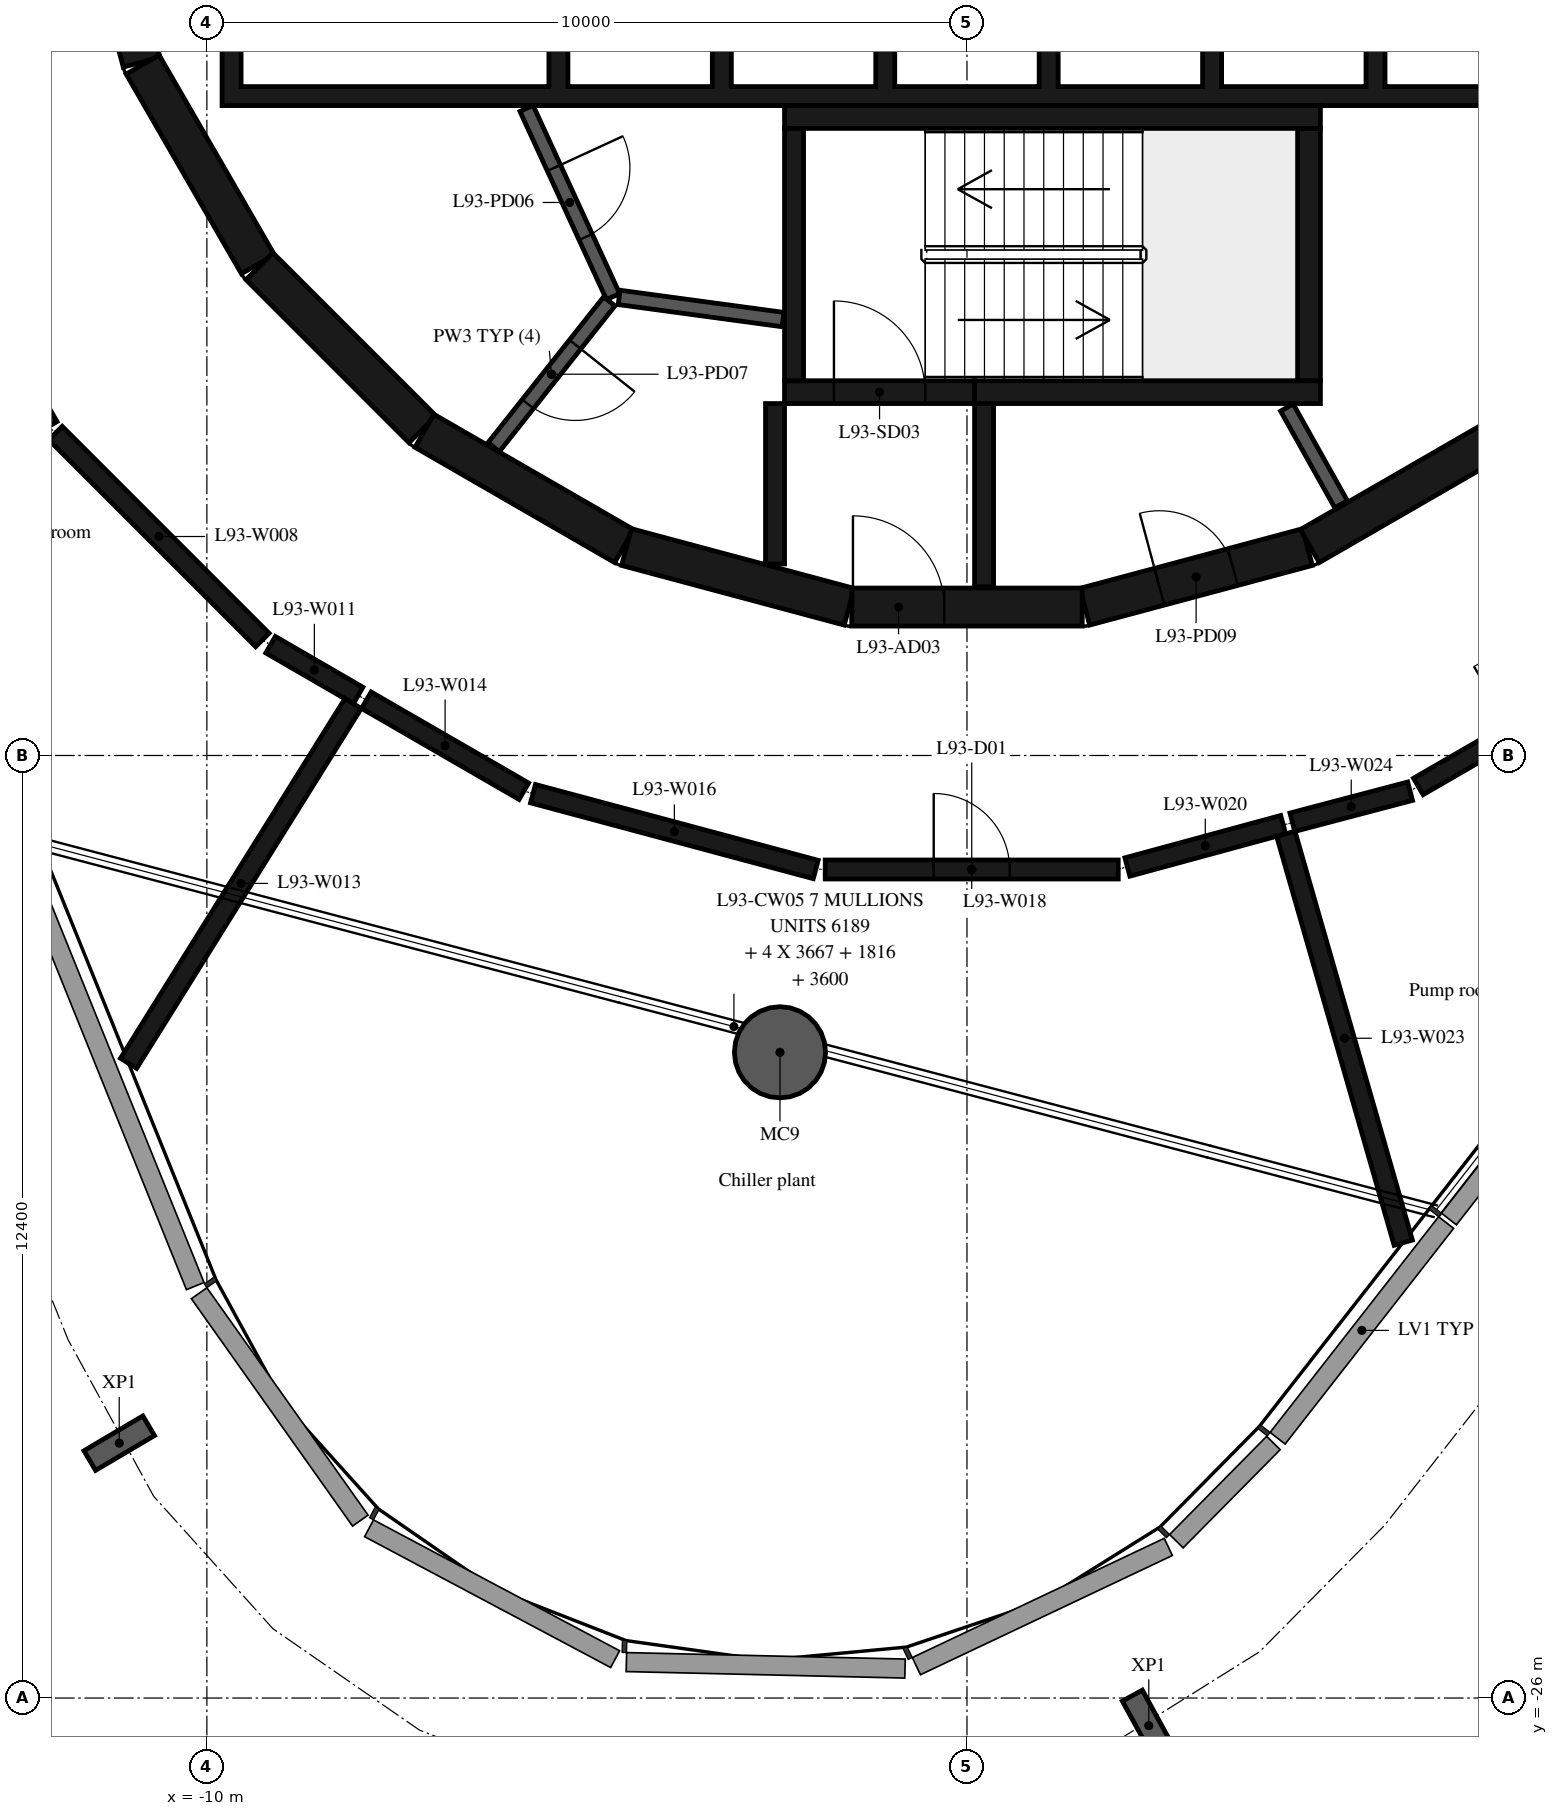
"""IFC4 building model, lengths in metres.
Left out: names, types, materials, properties, quantities, classifications, styles, units other than length and angle.
Written with IfcOpenShell. Run it as: python <this file> out.ifc"""

import sys

from ifc_helpers import new_model, si_unit, direction, frame, frame_2d, origin, origin_2d, place, context, subcontext, project, spatial, polyline, rectangle, hollow_circle, i_section, outline, extrude, element, fill, save


model = new_model("IFC4")
c1 = context("Model", 3, precision=1e-05, world=origin(), true_north=direction((0.0, 1.0)))
c2 = subcontext(c1, "Body", "Model", "MODEL_VIEW")
j1 = project(units=[si_unit("LENGTHUNIT", "METRE"), si_unit("PLANEANGLEUNIT", "RADIAN")], contexts=[c1])
p1 = place(None, origin())
s1 = spatial("IfcSite", under=j1, at=p1, CompositionType="ELEMENT")
p2 = place(p1, origin())
s2 = spatial("IfcBuilding", under=s1, at=p2, CompositionType="ELEMENT")
p3 = place(p2, frame((0.0, 0.0, 361.0)))
s3 = spatial("IfcBuildingStorey", under=s2, at=p3, CompositionType="ELEMENT", Elevation=361.0)
p4 = place(p3, frame((-2.46, -17.505, -0.38), z_axis=(0.0, 0.0, 1.0), x_axis=(1.0, 0.0, 0.0)))
e1 = element("IfcColumn", 1, at=p4, inside=s3, PredefinedType="COLUMN", context=c2, shape_type="SweptSolid", body=[
    extrude(hollow_circle(Radius=0.6, WallThickness=0.03, at=origin_2d()), origin(), (0.0, 0.0, 1.0), 5.2),
])
for number, where, z_axis, x_axis in (
    (2, (-11.153, -22.647, -0.38), (0.0, 0.0, 1.0), (-0.509, 0.861, 0.0)),
    (3, (2.392, -26.363, -0.38), (0.0, 0.0, 1.0), (-0.877, -0.48, 0.0)),
):
    element("IfcColumn", number, at=place(p3, frame(where, z_axis=z_axis, x_axis=x_axis)), inside=s3, PredefinedType="COLUMN", context=c2, shape_type="SweptSolid", body=[
        extrude(i_section(OverallWidth=0.3, OverallDepth=0.9, WebThickness=0.019, FlangeThickness=0.035, FilletRadius=0.03, at=origin_2d()), origin(), (0.0, 0.0, 1.0), 5.2),
    ])
p5 = place(p3, frame((1.55, -11.643, 0.0), z_axis=(0.0, 0.0, 1.0), x_axis=(0.965948410781, 0.258734743916, 0.0)))
e4 = element("IfcWall", 4, at=p5, inside=s3, PredefinedType="SHEAR", context=c2, shape_type="SweptSolid", body=[
    extrude(rectangle(XDim=3.033, YDim=0.5, at=frame_2d((1.516, 0.0))), origin(), (0.0, 0.0, 1.0), 4.82),
])
p6 = place(p5, frame((1.016, 0.0, 0.0)))
e5 = element("IfcOpeningElement", 5, at=p6, cuts=e4, PredefinedType="OPENING", context=c2, shape_type="SweptSolid", body=[
    extrude(rectangle(XDim=1.0, YDim=2.4, at=frame_2d((0.5, 1.2))), frame((0.0, 0.26, 0.0), z_axis=(0.0, -1.0, 0.0), x_axis=(1.0, 0.0, 0.0)), (0.0, 0.0, 1.0), 0.52),
])
p7 = place(p3, frame((4.51, -10.845, 0.0), z_axis=(0.0, 0.0, 1.0), x_axis=(0.865975092491, 0.500087131594, 0.0)))
e6 = element("IfcWall", 6, at=p7, inside=s3, PredefinedType="SHEAR", context=c2, shape_type="SweptSolid", body=[
    extrude(rectangle(XDim=3.033, YDim=0.5, at=frame_2d((1.516, 0.0))), origin(), (0.0, 0.0, 1.0), 4.82),
])
p8 = place(p3, frame((-11.643, -1.55, 0.0), z_axis=(0.0, 0.0, 1.0), x_axis=(0.258734743916, -0.965948410781, 0.0)))
e7 = element("IfcWall", 7, at=p8, inside=s3, PredefinedType="SHEAR", context=c2, shape_type="SweptSolid", body=[
    extrude(rectangle(XDim=3.033, YDim=0.5, at=frame_2d((1.516, 0.0))), origin(), (0.0, 0.0, 1.0), 4.82),
])
p9 = place(p8, frame((1.016, 0.0, 0.0)))
e8 = element("IfcOpeningElement", 8, at=p9, cuts=e7, PredefinedType="OPENING", context=c2, shape_type="SweptSolid", body=[
    extrude(rectangle(XDim=1.0, YDim=2.4, at=frame_2d((0.5, 1.2))), frame((0.0, 0.26, 0.0), z_axis=(0.0, -1.0, 0.0), x_axis=(1.0, 0.0, 0.0)), (0.0, 0.0, 1.0), 0.52),
])
p10 = place(p3, frame((-10.845, -4.51, 0.0), z_axis=(0.0, 0.0, 1.0), x_axis=(0.500087131594, -0.865975092491, 0.0)))
e9 = element("IfcWall", 9, at=p10, inside=s3, PredefinedType="SHEAR", context=c2, shape_type="SweptSolid", body=[
    extrude(rectangle(XDim=3.033, YDim=0.5, at=frame_2d((1.516, 0.0))), origin(), (0.0, 0.0, 1.0), 4.82),
])
p11 = place(p3, frame((-9.308, -7.164, 0.0), z_axis=(0.0, 0.0, 1.0), x_axis=(0.707106781187, -0.707106781187, 0.0)))
e10 = element("IfcWall", 10, at=p11, inside=s3, PredefinedType="SHEAR", context=c2, shape_type="SweptSolid", body=[
    extrude(rectangle(XDim=3.032, YDim=0.5, at=frame_2d((1.516, 0.0))), origin(), (0.0, 0.0, 1.0), 4.82),
])
for number, where, z_axis, x_axis in (
    (11, (-7.137, -9.329, 0.0), (0.0, 0.0, 1.0), (0.866, -0.5, 0.0)),
    (12, (-4.479, -10.858, 0.0), (0.0, 0.0, 1.0), (0.966, -0.259, 0.0)),
):
    element("IfcWall", number, at=place(p3, frame(where, z_axis=z_axis, x_axis=x_axis)), inside=s3, PredefinedType="SHEAR", context=c2, shape_type="SweptSolid", body=[
        extrude(rectangle(XDim=3.033, YDim=0.5, at=frame_2d((1.516, 0.0))), origin(), (0.0, 0.0, 1.0), 4.82),
    ])
p12 = place(p3, frame((-1.516, -11.647, 0.0), z_axis=(0.0, 0.0, 1.0), x_axis=(1.0, 0.0, 0.0)))
e13 = element("IfcWall", 13, at=p12, inside=s3, PredefinedType="SHEAR", context=c2, shape_type="SweptSolid", body=[
    extrude(rectangle(XDim=3.033, YDim=0.5, at=frame_2d((1.516, 0.0))), origin(), (0.0, 0.0, 1.0), 4.82),
])
p13 = place(p12, frame((0.016, 0.0, 0.0)))
e14 = element("IfcOpeningElement", 14, at=p13, cuts=e13, PredefinedType="OPENING", context=c2, shape_type="SweptSolid", body=[
    extrude(rectangle(XDim=1.2, YDim=2.1, at=frame_2d((0.6, 1.05))), frame((0.0, 0.26, 0.0), z_axis=(0.0, -1.0, 0.0), x_axis=(1.0, 0.0, 0.0)), (0.0, 0.0, 1.0), 0.52),
])
p14 = place(p3, frame((-2.275, -8.67, 0.0), z_axis=(0.0, 0.0, 1.0), x_axis=(0.0, 1.0, 0.0)))
e15 = element("IfcWall", 15, at=p14, inside=s3, PredefinedType="SHEAR", context=c2, shape_type="SweptSolid", body=[
    extrude(rectangle(XDim=3.32, YDim=0.25, at=frame_2d((1.66, 0.0))), origin(), (0.0, 0.0, 1.0), 4.82),
])
p15 = place(p3, frame((-2.4, -5.2, 0.0), z_axis=(0.0, 0.0, 1.0), x_axis=(1.0, 0.0, 0.0)))
e16 = element("IfcWall", 16, at=p15, inside=s3, PredefinedType="SHEAR", context=c2, shape_type="SweptSolid", body=[
    extrude(rectangle(XDim=7.05, YDim=0.3, at=frame_2d((3.525, 0.0))), origin(), (0.0, 0.0, 1.0), 4.82),
])
p16 = place(p3, frame((4.5, -8.67, 0.0), z_axis=(0.0, 0.0, 1.0), x_axis=(0.0, 1.0, 0.0)))
e17 = element("IfcWall", 17, at=p16, inside=s3, PredefinedType="SHEAR", context=c2, shape_type="SweptSolid", body=[
    extrude(rectangle(XDim=3.32, YDim=0.3, at=frame_2d((1.66, 0.0))), origin(), (0.0, 0.0, 1.0), 4.82),
])
p17 = place(p3, frame((0.1, -8.82, 0.0), z_axis=(0.0, 0.0, 1.0), x_axis=(1.0, 0.0, 0.0)))
e18 = element("IfcWall", 18, at=p17, inside=s3, PredefinedType="SHEAR", context=c2, shape_type="SweptSolid", body=[
    extrude(rectangle(XDim=4.55, YDim=0.3, at=frame_2d((2.275, 0.0))), origin(), (0.0, 0.0, 1.0), 4.82),
])
p18 = place(p3, frame((-2.4, -8.82, 0.0), z_axis=(0.0, 0.0, 1.0), x_axis=(1.0, 0.0, 0.0)))
e19 = element("IfcWall", 19, at=p18, inside=s3, PredefinedType="SHEAR", context=c2, shape_type="SweptSolid", body=[
    extrude(rectangle(XDim=2.5, YDim=0.3, at=frame_2d((1.25, 0.0))), origin(), (0.0, 0.0, 1.0), 4.82),
])
p19 = place(p18, frame((0.65, 0.0, 0.0)))
e20 = element("IfcOpeningElement", 20, at=p19, cuts=e19, PredefinedType="OPENING", context=c2, shape_type="SweptSolid", body=[
    extrude(rectangle(XDim=1.2, YDim=2.1, at=frame_2d((0.6, 1.05))), frame((0.0, 0.16, 0.0), z_axis=(0.0, -1.0, 0.0), x_axis=(1.0, 0.0, 0.0)), (0.0, 0.0, 1.0), 0.32),
])
p20 = place(p3, frame((-2.525, -8.97, 0.0), z_axis=(0.0, 0.0, 1.0), x_axis=(0.0, -1.0, 0.0)))
e21 = element("IfcWall", 21, at=p20, inside=s3, PredefinedType="SHEAR", context=c2, shape_type="SweptSolid", body=[
    extrude(rectangle(XDim=2.11, YDim=0.25, at=frame_2d((1.055, 0.0))), origin(), (0.0, 0.0, 1.0), 4.82),
])
p21 = place(p3, frame((0.225, -8.97, 0.0), z_axis=(0.0, 0.0, 1.0), x_axis=(0.0, -1.0, 0.0)))
e22 = element("IfcWall", 22, at=p21, inside=s3, PredefinedType="SHEAR", context=c2, shape_type="SweptSolid", body=[
    extrude(rectangle(XDim=2.41, YDim=0.25, at=frame_2d((1.205, 0.0))), origin(), (0.0, 0.0, 1.0), 4.82),
])
p22 = place(p3, origin())
e23 = element("IfcWall", 23, at=p22, inside=s3, PredefinedType="SHEAR", context=c2, shape_type="SweptSolid", body=[
    extrude(outline(polyline([(9.8, -5.05), (9.8, -4.8), (9.8, -1.9), (9.55, -1.9), (9.55, -4.8), (7.65, -4.8), (7.65, -1.9), (7.4, -1.9), (7.4, -4.8), (5.5, -4.8), (5.5, -1.9), (5.25, -1.9), (5.25, -4.8), (3.35, -4.8), (3.35, -1.9), (3.1, -1.9), (3.1, -4.8), (1.2, -4.8), (1.2, -1.9), (0.95, -1.9), (0.95, -4.8), (-0.95, -4.8), (-0.95, -1.9), (-1.2, -1.9), (-1.2, -4.8), (-3.1, -4.8), (-3.1, -1.9), (-3.35, -1.9), (-3.35, -4.8), (-5.25, -4.8), (-5.25, -1.9), (-5.5, -1.9), (-5.5, -4.8), (-9.55, -4.8), (-9.55, -1.9), (-9.8, -1.9), (-9.8, -4.8), (-9.8, -5.05), (9.8, -5.05)])), origin(), (0.0, 0.0, 1.0), 4.82),
])
p23 = place(p3, frame((4.922, -10.296, 0.0), z_axis=(0.0, 0.0, 1.0), x_axis=(-0.48860846254, 0.872503163509, 0.0)))
e24 = element("IfcWall", 24, at=p23, inside=s3, PredefinedType="PARTITIONING", context=c2, shape_type="SweptSolid", body=[
    extrude(rectangle(XDim=1.459, YDim=0.19, at=frame_2d((0.73, 0.0))), origin(), (0.0, 0.0, 1.0), 4.82),
])
p24 = place(p3, frame((-5.795, -5.086, 0.0), z_axis=(0.0, 0.0, 1.0), x_axis=(0.417887867606, -0.908498613157, 0.0)))
e25 = element("IfcWall", 25, at=p24, inside=s3, PredefinedType="PARTITIONING", context=c2, shape_type="SweptSolid", body=[
    extrude(rectangle(XDim=2.726, YDim=0.19, at=frame_2d((1.363, 0.0))), origin(), (0.0, 0.0, 1.0), 4.82),
])
p25 = place(p24, frame((0.863, 0.0, 0.0)))
e26 = element("IfcOpeningElement", 26, at=p25, cuts=e25, PredefinedType="OPENING", context=c2, shape_type="SweptSolid", body=[
    extrude(rectangle(XDim=1.0, YDim=2.4, at=frame_2d((0.5, 1.2))), frame((0.0, 0.105, 0.0), z_axis=(0.0, -1.0, 0.0), x_axis=(1.0, 0.0, 0.0)), (0.0, 0.0, 1.0), 0.21),
])
p26 = place(p3, frame((-4.706, -7.625, 0.0), z_axis=(0.0, 0.0, 1.0), x_axis=(-0.621392599334, -0.783499353856, 0.0)))
e27 = element("IfcWall", 27, at=p26, inside=s3, PredefinedType="PARTITIONING", context=c2, shape_type="SweptSolid", body=[
    extrude(rectangle(XDim=2.447, YDim=0.19, at=frame_2d((1.224, 0.0))), origin(), (0.0, 0.0, 1.0), 4.82),
])
p27 = place(p26, frame((0.724, 0.0, 0.0)))
e28 = element("IfcOpeningElement", 28, at=p27, cuts=e27, PredefinedType="OPENING", context=c2, shape_type="SweptSolid", body=[
    extrude(rectangle(XDim=1.0, YDim=2.4, at=frame_2d((0.5, 1.2))), frame((0.0, 0.105, 0.0), z_axis=(0.0, -1.0, 0.0), x_axis=(1.0, 0.0, 0.0)), (0.0, 0.0, 1.0), 0.21),
])
p28 = place(p3, frame((-2.42, -7.865, 0.0), z_axis=(0.0, 0.0, 1.0), x_axis=(-0.990972299108, 0.134066783362, 0.0)))
e29 = element("IfcWall", 29, at=p28, inside=s3, PredefinedType="PARTITIONING", context=c2, shape_type="SweptSolid", body=[
    extrude(rectangle(XDim=2.176, YDim=0.19, at=frame_2d((1.088, 0.0))), origin(), (0.0, 0.0, 1.0), 4.82),
])
p29 = place(p3, frame((-14.007, -5.938, 0.0), z_axis=(0.0, 0.0, 1.0), x_axis=(0.500708693508, -0.865615852585, 0.0)))
e30 = element("IfcWall", 30, at=p29, inside=s3, PredefinedType="PARTITIONING", context=c2, shape_type="SweptSolid", body=[
    extrude(rectangle(XDim=3.849, YDim=0.25, at=frame_2d((1.925, 0.0))), origin(), (0.0, 0.0, 1.0), 4.82),
])
p30 = place(p29, frame((1.425, 0.0, 0.0)))
e31 = element("IfcOpeningElement", 31, at=p30, cuts=e30, PredefinedType="OPENING", context=c2, shape_type="SweptSolid", body=[
    extrude(rectangle(XDim=1.0, YDim=2.1, at=frame_2d((0.5, 1.05))), frame((0.0, 0.135, 0.0), z_axis=(0.0, -1.0, 0.0), x_axis=(1.0, 0.0, 0.0)), (0.0, 0.0, 1.0), 0.27),
])
p31 = place(p3, frame((-11.992, -9.358, 0.0), z_axis=(0.0, 0.0, 1.0), x_axis=(0.707106781187, -0.707106781187, 0.0)))
e32 = element("IfcWall", 32, at=p31, inside=s3, PredefinedType="PARTITIONING", context=c2, shape_type="SweptSolid", body=[
    extrude(rectangle(XDim=3.849, YDim=0.25, at=frame_2d((1.925, 0.0))), origin(), (0.0, 0.0, 1.0), 4.82),
])
p32 = place(p3, frame((-9.162, -12.143, 0.0), z_axis=(0.0, 0.0, 1.0), x_axis=(0.865225325987, -0.501383221968, 0.0)))
e33 = element("IfcWall", 33, at=p32, inside=s3, PredefinedType="PARTITIONING", context=c2, shape_type="SweptSolid", body=[
    extrude(rectangle(XDim=1.331, YDim=0.25, at=frame_2d((0.666, 0.0))), origin(), (0.0, 0.0, 1.0), 4.82),
])
p33 = place(p3, frame((-8.076, -12.916, 0.0), z_axis=(0.0, 0.0, 1.0), x_axis=(-0.529377395223, -0.848386452878, 0.0)))
e34 = element("IfcWall", 34, at=p33, inside=s3, PredefinedType="PARTITIONING", context=c2, shape_type="SweptSolid", body=[
    extrude(rectangle(XDim=5.58, YDim=0.25, at=frame_2d((2.79, 0.0))), origin(), (0.0, 0.0, 1.0), 4.82),
])
p34 = place(p3, frame((-7.902, -12.873, 0.0), z_axis=(0.0, 0.0, 1.0), x_axis=(0.865777653854, -0.500428870157, 0.0)))
e35 = element("IfcWall", 35, at=p34, inside=s3, PredefinedType="PARTITIONING", context=c2, shape_type="SweptSolid", body=[
    extrude(rectangle(XDim=2.393, YDim=0.25, at=frame_2d((1.197, 0.0))), origin(), (0.0, 0.0, 1.0), 4.82),
])
p35 = place(p3, frame((-5.709, -14.102, 0.0), z_axis=(0.0, 0.0, 1.0), x_axis=(0.965845546311, -0.259118468411, 0.0)))
e36 = element("IfcWall", 36, at=p35, inside=s3, PredefinedType="PARTITIONING", context=c2, shape_type="SweptSolid", body=[
    extrude(rectangle(XDim=3.851, YDim=0.25, at=frame_2d((1.925, 0.0))), origin(), (0.0, 0.0, 1.0), 4.82),
])
p36 = place(p3, frame((-1.865, -15.1, 0.0), z_axis=(0.0, 0.0, 1.0), x_axis=(1.0, 0.0, 0.0)))
e37 = element("IfcWall", 37, at=p36, inside=s3, PredefinedType="PARTITIONING", context=c2, shape_type="SweptSolid", body=[
    extrude(rectangle(XDim=3.855, YDim=0.25, at=frame_2d((1.927, 0.0))), origin(), (0.0, 0.0, 1.0), 4.82),
])
p37 = place(p36, frame((1.427, 0.0, 0.0)))
e38 = element("IfcOpeningElement", 38, at=p37, cuts=e37, PredefinedType="OPENING", context=c2, shape_type="SweptSolid", body=[
    extrude(rectangle(XDim=1.0, YDim=2.1, at=frame_2d((0.5, 1.05))), frame((0.0, 0.135, 0.0), z_axis=(0.0, -1.0, 0.0), x_axis=(1.0, 0.0, 0.0)), (0.0, 0.0, 1.0), 0.27),
])
p38 = place(p3, frame((2.111, -15.067, 0.0), z_axis=(0.0, 0.0, 1.0), x_axis=(0.964975741564, 0.262339128216, 0.0)))
e39 = element("IfcWall", 39, at=p38, inside=s3, PredefinedType="PARTITIONING", context=c2, shape_type="SweptSolid", body=[
    extrude(rectangle(XDim=2.124, YDim=0.25, at=frame_2d((1.062, 0.0))), origin(), (0.0, 0.0, 1.0), 4.82),
])
p39 = place(p3, frame((4.195, -14.63, 0.0), z_axis=(0.0, 0.0, 1.0), x_axis=(0.276091885253, -0.961131245407, 0.0)))
e40 = element("IfcWall", 40, at=p39, inside=s3, PredefinedType="PARTITIONING", context=c2, shape_type="SweptSolid", body=[
    extrude(rectangle(XDim=5.597, YDim=0.25, at=frame_2d((2.799, 0.0))), origin(), (0.0, 0.0, 1.0), 4.43),
])
p40 = place(p3, frame((4.281, -14.478, 0.0), z_axis=(0.0, 0.0, 1.0), x_axis=(0.966999489871, 0.254778308709, 0.0)))
e41 = element("IfcWall", 41, at=p40, inside=s3, PredefinedType="PARTITIONING", context=c2, shape_type="SweptSolid", body=[
    extrude(rectangle(XDim=1.602, YDim=0.25, at=frame_2d((0.801, 0.0))), origin(), (0.0, 0.0, 1.0), 4.82),
])
p41 = place(p3, frame((5.938, -14.007, 0.0), z_axis=(0.0, 0.0, 1.0), x_axis=(0.865615852585, 0.500708693508, 0.0)))
e42 = element("IfcWall", 42, at=p41, inside=s3, PredefinedType="PARTITIONING", context=c2, shape_type="SweptSolid", body=[
    extrude(rectangle(XDim=3.849, YDim=0.25, at=frame_2d((1.925, 0.0))), origin(), (0.0, 0.0, 1.0), 4.82),
])
p42 = place(p41, frame((1.425, 0.0, 0.0)))
e43 = element("IfcOpeningElement", 43, at=p42, cuts=e42, PredefinedType="OPENING", context=c2, shape_type="SweptSolid", body=[
    extrude(rectangle(XDim=1.0, YDim=2.1, at=frame_2d((0.5, 1.05))), frame((0.0, 0.135, 0.0), z_axis=(0.0, -1.0, 0.0), x_axis=(1.0, 0.0, 0.0)), (0.0, 0.0, 1.0), 0.27),
])
p43 = place(p19, origin())
e44 = element("IfcDoor", 44, at=p43, inside=s3, OperationType="SINGLE_SWING_LEFT", PredefinedType="DOOR", context=c2, shape_type="SweptSolid", body=[
    extrude(rectangle(XDim=1.2, YDim=2.1, at=frame_2d((0.6, 1.05))), frame((0.0, 0.025, 0.0), z_axis=(0.0, -1.0, 0.0), x_axis=(1.0, 0.0, 0.0)), (0.0, 0.0, 1.0), 0.05),
])
fill(e20, e44)
p44 = place(p13, origin())
e45 = element("IfcDoor", 45, at=p44, inside=s3, OperationType="SINGLE_SWING_RIGHT", PredefinedType="DOOR", context=c2, shape_type="SweptSolid", body=[
    extrude(rectangle(XDim=1.2, YDim=2.1, at=frame_2d((0.6, 1.05))), frame((0.0, 0.025, 0.0), z_axis=(0.0, -1.0, 0.0), x_axis=(1.0, 0.0, 0.0)), (0.0, 0.0, 1.0), 0.05),
])
fill(e14, e45)
p45 = place(p25, origin())
e46 = element("IfcDoor", 46, at=p45, inside=s3, OperationType="SINGLE_SWING_LEFT", PredefinedType="DOOR", context=c2, shape_type="SweptSolid", body=[
    extrude(rectangle(XDim=1.0, YDim=2.4, at=frame_2d((0.5, 1.2))), frame((0.0, 0.025, 0.0), z_axis=(0.0, -1.0, 0.0), x_axis=(1.0, 0.0, 0.0)), (0.0, 0.0, 1.0), 0.05),
])
fill(e26, e46)
p46 = place(p27, origin())
e47 = element("IfcDoor", 47, at=p46, inside=s3, OperationType="SINGLE_SWING_RIGHT", PredefinedType="DOOR", context=c2, shape_type="SweptSolid", body=[
    extrude(rectangle(XDim=1.0, YDim=2.4, at=frame_2d((0.5, 1.2))), frame((0.0, 0.025, 0.0), z_axis=(0.0, -1.0, 0.0), x_axis=(1.0, 0.0, 0.0)), (0.0, 0.0, 1.0), 0.05),
])
fill(e28, e47)
p47 = place(p6, origin())
e48 = element("IfcDoor", 48, at=p47, inside=s3, OperationType="SINGLE_SWING_RIGHT", PredefinedType="DOOR", context=c2, shape_type="SweptSolid", body=[
    extrude(rectangle(XDim=1.0, YDim=2.4, at=frame_2d((0.5, 1.2))), frame((0.0, 0.025, 0.0), z_axis=(0.0, -1.0, 0.0), x_axis=(1.0, 0.0, 0.0)), (0.0, 0.0, 1.0), 0.05),
])
fill(e5, e48)
p48 = place(p37, origin())
e49 = element("IfcDoor", 49, at=p48, inside=s3, OperationType="SINGLE_SWING_LEFT", PredefinedType="DOOR", context=c2, shape_type="SweptSolid", body=[
    extrude(rectangle(XDim=1.0, YDim=2.1, at=frame_2d((0.5, 1.05))), frame((0.0, 0.025, 0.0), z_axis=(0.0, -1.0, 0.0), x_axis=(1.0, 0.0, 0.0)), (0.0, 0.0, 1.0), 0.05),
])
fill(e38, e49)
save(model, sys.argv[1])
